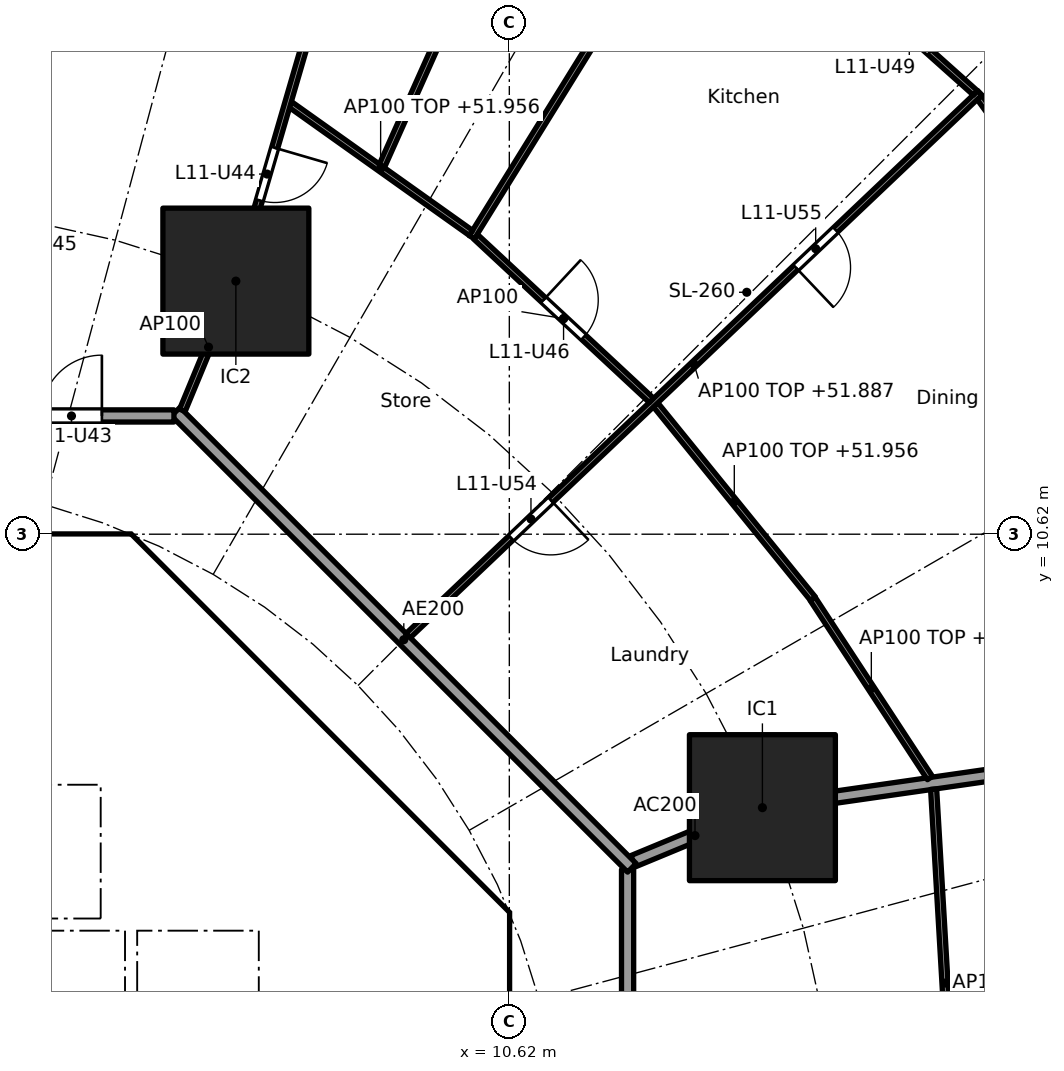
"""IFC4 building model, lengths in metres.
Left out: names, types, materials, properties, quantities, classifications, styles, units other than length and angle.
Written with IfcOpenShell. Run it as: python <this file> out.ifc"""

import sys

from ifc_helpers import new_model, si_unit, direction, frame, frame_2d, origin, origin_2d, place, context, subcontext, project, spatial, polyline, rectangle, outline, extrude, element, fill, save


model = new_model("IFC4")
c1 = context("Model", 3, precision=1e-05, world=origin(), true_north=direction((0.0, 1.0)))
c2 = subcontext(c1, "Body", "Model", "MODEL_VIEW")
j1 = project(units=[si_unit("LENGTHUNIT", "METRE"), si_unit("PLANEANGLEUNIT", "RADIAN")], contexts=[c1])
p1 = place(None, origin())
s1 = spatial("IfcSite", under=j1, at=p1, CompositionType="ELEMENT")
p2 = place(p1, origin())
s2 = spatial("IfcBuilding", under=s1, at=p2, CompositionType="ELEMENT")
p3 = place(p2, frame((0.0, 0.0, 49.2)))
s3 = spatial("IfcBuildingStorey", under=s2, at=p3, CompositionType="ELEMENT", Elevation=49.2)
for number, where, z_axis, x_axis in (
    (1, (14.782, 6.123, 0.0), (0.0, 0.0, 1.0), (1.0, 0.0, 0.0)),
    (2, (6.123, 14.782, 0.0), (0.0, 0.0, 1.0), (1.0, 0.0, 0.0)),
):
    element("IfcColumn", number, at=place(p3, frame(where, z_axis=z_axis, x_axis=x_axis)), inside=s3, PredefinedType="COLUMN", context=c2, shape_type="SweptSolid", body=[
        extrude(rectangle(XDim=2.4, YDim=2.4, at=origin_2d()), origin(), (0.0, 0.0, 1.0), 3.7),
    ])
p4 = place(p3, frame((9.988, 4.613, 0.0), z_axis=(0.0, 0.0, 1.0), x_axis=(-0.707106781187, 0.707106781187, 0.0)))
e3 = element("IfcWall", 3, at=p4, inside=s3, PredefinedType="SHEAR", context=c2, shape_type="SweptSolid", body=[
    extrude(rectangle(XDim=7.602, YDim=0.6, at=frame_2d((3.801, 0.0))), origin(), (0.0, 0.0, 1.0), 3.44),
])
p5 = place(p4, frame((3.201, 0.0, 0.0)))
e4 = element("IfcOpeningElement", 4, at=p5, cuts=e3, PredefinedType="OPENING", context=c2, shape_type="SweptSolid", body=[
    extrude(rectangle(XDim=1.2, YDim=2.1, at=frame_2d((0.6, 1.05))), frame((0.0, 0.31, 0.0), z_axis=(0.0, -1.0, 0.0), x_axis=(1.0, 0.0, 0.0)), (0.0, 0.0, 1.0), 0.62),
])
p6 = place(p3, frame((4.0, 4.3, 0.0), z_axis=(0.0, 0.0, 1.0), x_axis=(0.0, 1.0, 0.0)))
e5 = element("IfcWall", 5, at=p6, inside=s3, PredefinedType="SOLIDWALL", context=c2, shape_type="SweptSolid", body=[
    extrude(rectangle(XDim=2.2, YDim=0.2, at=frame_2d((1.1, 0.0))), origin(), (0.0, 0.0, 1.0), 3.44),
])
p7 = place(p6, frame((0.55, 0.0, 0.0)))
e6 = element("IfcOpeningElement", 6, at=p7, cuts=e5, PredefinedType="OPENING", context=c2, shape_type="SweptSolid", body=[
    extrude(rectangle(XDim=1.1, YDim=2.1, at=frame_2d((0.55, 1.05))), frame((0.0, 0.11, 0.0), z_axis=(0.0, -1.0, 0.0), x_axis=(1.0, 0.0, 0.0)), (0.0, 0.0, 1.0), 0.22),
])
p8 = place(p3, frame((6.7, 4.0, 0.0), z_axis=(0.0, 0.0, 1.0), x_axis=(1.0, 0.0, 0.0)))
e7 = element("IfcWall", 7, at=p8, inside=s3, PredefinedType="SOLIDWALL", context=c2, shape_type="SweptSolid", body=[
    extrude(rectangle(XDim=3.325, YDim=0.2, at=frame_2d((1.662, 0.0))), origin(), (0.0, 0.0, 1.0), 3.44),
])
p9 = place(p8, frame((1.25, 0.0, 0.0)))
e8 = element("IfcOpeningElement", 8, at=p9, cuts=e7, PredefinedType="OPENING", context=c2, shape_type="SweptSolid", body=[
    extrude(rectangle(XDim=1.1, YDim=2.1, at=frame_2d((0.55, 1.05))), frame((0.0, 0.11, 0.0), z_axis=(0.0, -1.0, 0.0), x_axis=(1.0, 0.0, 0.0)), (0.0, 0.0, 1.0), 0.22),
])
p10 = place(p3, frame((4.0, 7.025, 0.0), z_axis=(0.0, 0.0, 1.0), x_axis=(0.0, 1.0, 0.0)))
e9 = element("IfcWall", 9, at=p10, inside=s3, PredefinedType="SOLIDWALL", context=c2, shape_type="SweptSolid", body=[
    extrude(rectangle(XDim=3.0, YDim=0.2, at=frame_2d((1.5, 0.0))), origin(), (0.0, 0.0, 1.0), 3.44),
])
p11 = place(p10, frame((0.925, 0.0, 0.0)))
e10 = element("IfcOpeningElement", 10, at=p11, cuts=e9, PredefinedType="OPENING", context=c2, shape_type="SweptSolid", body=[
    extrude(rectangle(XDim=1.1, YDim=2.1, at=frame_2d((0.55, 1.05))), frame((0.0, 0.11, 0.0), z_axis=(0.0, -1.0, 0.0), x_axis=(1.0, 0.0, 0.0)), (0.0, 0.0, 1.0), 0.22),
])
p12 = place(p3, origin())
e11 = element("IfcWall", 11, at=p12, inside=s3, PredefinedType="SHEAR", context=c2, shape_type="SweptSolid", body=[
    extrude(outline(polyline([(-4.152, 10.025), (-4.401, 9.776), (-4.825, 10.2), (-4.401, 10.625), (4.401, 10.625), (4.825, 10.2), (4.401, 9.776), (4.152, 10.025), (-4.152, 10.025)])), origin(), (0.0, 0.0, 1.0), 3.44),
])
p13 = place(p3, origin())
e12 = element("IfcWall", 12, at=p13, inside=s3, PredefinedType="SHEAR", context=c2, shape_type="SweptSolid", body=[
    extrude(outline(polyline([(9.776, -4.401), (10.025, -4.152), (10.025, -3.801), (10.025, 4.152), (9.776, 4.401), (10.2, 4.825), (10.625, 4.401), (10.625, -4.401), (10.2, -4.825), (9.776, -4.401)])), origin(), (0.0, 0.0, 1.0), 3.44),
])
p14 = place(p3, origin())
e13 = element("IfcWall", 13, at=p14, inside=s3, PredefinedType="SOLIDWALL", context=c2, shape_type="SweptSolid", body=[
    extrude(outline(polyline([(-6.5, 2.1), (-6.7, 2.1), (-6.7, 4.3), (6.7, 4.3), (6.7, 2.1), (6.5, 2.1), (6.5, 4.1), (4.5, 4.1), (4.5, 2.1), (4.3, 2.1), (4.3, 4.1), (2.3, 4.1), (2.3, 2.1), (2.1, 2.1), (2.1, 4.1), (0.1, 4.1), (0.1, 2.1), (-0.1, 2.1), (-0.1, 4.1), (-2.1, 4.1), (-2.1, 2.1), (-2.3, 2.1), (-2.3, 4.1), (-4.3, 4.1), (-4.3, 2.1), (-4.5, 2.1), (-4.5, 4.1), (-6.5, 4.1), (-6.5, 2.1)])), origin(), (0.0, 0.0, 1.0), 3.44),
])
p15 = place(p3, origin())
e14 = element("IfcWall", 14, at=p15, inside=s3, PredefinedType="SOLIDWALL", context=c2, shape_type="SweptSolid", body=[
    extrude(outline(polyline([(4.1, 6.5), (-4.1, 6.5), (-4.1, 7.025), (4.1, 7.025), (4.1, 6.5)])), origin(), (0.0, 0.0, 1.0), 3.44),
])
p16 = place(p3, origin())
e15 = element("IfcWall", 15, at=p16, inside=s3, PredefinedType="SOLIDWALL", context=c2, shape_type="SweptSolid", body=[
    extrude(outline(polyline([(7.025, -3.9), (6.7, -3.9), (6.7, 3.9), (7.025, 3.9), (7.025, -3.9)])), origin(), (0.0, 0.0, 1.0), 3.44),
])
p17 = place(p3, frame((12.657, 5.243, 0.0), z_axis=(0.0, 0.0, 1.0), x_axis=(0.923853160736, 0.382747093259, 0.0)))
e16 = element("IfcWall", 16, at=p17, inside=s3, PredefinedType="PARTITIONING", context=c2, shape_type="SweptSolid", body=[
    extrude(rectangle(XDim=2.2, YDim=0.2, at=frame_2d((1.1, 0.0))), origin(), (0.0, 0.0, 1.0), 3.44),
])
p18 = place(p3, frame((14.832, 6.13, 0.0), z_axis=(0.0, 0.0, 1.0), x_axis=(0.989836541293, 0.142209779978, 0.0)))
e17 = element("IfcWall", 17, at=p18, inside=s3, PredefinedType="PARTITIONING", context=c2, shape_type="SweptSolid", body=[
    extrude(rectangle(XDim=15.909, YDim=0.2, at=frame_2d((7.955, 0.0))), origin(), (0.0, 0.0, 1.0), 2.756),
])
p19 = place(p3, frame((12.565, -5.104, 0.0), z_axis=(0.0, 0.0, 1.0), x_axis=(0.0, 1.0, 0.0)))
e18 = element("IfcWall", 18, at=p19, inside=s3, PredefinedType="PARTITIONING", context=c2, shape_type="SweptSolid", body=[
    extrude(rectangle(XDim=10.209, YDim=0.2, at=frame_2d((5.104, 0.0))), origin(), (0.0, 0.0, 1.0), 3.44),
])
p20 = place(p3, frame((12.635, 5.134, 0.0), z_axis=(0.0, 0.0, 1.0), x_axis=(-0.707106781187, 0.707106781187, 0.0)))
e19 = element("IfcWall", 19, at=p20, inside=s3, PredefinedType="PARTITIONING", context=c2, shape_type="SweptSolid", body=[
    extrude(rectangle(XDim=10.609, YDim=0.2, at=frame_2d((5.305, 0.0))), origin(), (0.0, 0.0, 1.0), 3.44),
])
p21 = place(p3, frame((5.104, 12.565, 0.0), z_axis=(0.0, 0.0, 1.0), x_axis=(-1.0, 0.0, 0.0)))
e20 = element("IfcWall", 20, at=p21, inside=s3, PredefinedType="PARTITIONING", context=c2, shape_type="SweptSolid", body=[
    extrude(rectangle(XDim=10.409, YDim=0.2, at=frame_2d((5.205, 0.0))), origin(), (0.0, 0.0, 1.0), 3.44),
])
p22 = place(p21, frame((1.185, 0.0, 0.0)))
e21 = element("IfcOpeningElement", 21, at=p22, cuts=e20, PredefinedType="OPENING", context=c2, shape_type="SweptSolid", body=[
    extrude(rectangle(XDim=1.0, YDim=2.1, at=frame_2d((0.5, 1.05))), frame((0.0, 0.11, 0.0), z_axis=(0.0, -1.0, 0.0), x_axis=(1.0, 0.0, 0.0)), (0.0, 0.0, 1.0), 0.22),
])
p23 = place(p3, frame((17.971, 0.05, 0.0), z_axis=(0.0, 0.0, 1.0), x_axis=(-0.058513659907, 0.998286607946, 0.0)))
e22 = element("IfcWall", 22, at=p23, inside=s3, PredefinedType="PARTITIONING", context=c2, shape_type="SweptSolid", body=[
    extrude(rectangle(XDim=6.388, YDim=0.1, at=frame_2d((3.194, 0.0))), origin(), (0.0, 0.0, 1.0), 2.756),
])
p24 = place(p3, frame((17.537, 6.61, 0.0), z_axis=(0.0, 0.0, 1.0), x_axis=(-0.547637987196, 0.836715384692, 0.0)))
e23 = element("IfcWall", 23, at=p24, inside=s3, PredefinedType="PARTITIONING", context=c2, shape_type="SweptSolid", body=[
    extrude(rectangle(XDim=3.52, YDim=0.1, at=frame_2d((1.76, 0.0))), origin(), (0.0, 0.0, 1.0), 2.756),
])
p25 = place(p3, frame((15.614, 9.559, 0.0), z_axis=(0.0, 0.0, 1.0), x_axis=(-0.63012473344, 0.776493928056, 0.0)))
e24 = element("IfcWall", 24, at=p25, inside=s3, PredefinedType="PARTITIONING", context=c2, shape_type="SweptSolid", body=[
    extrude(rectangle(XDim=4.106, YDim=0.1, at=frame_2d((2.053, 0.0))), origin(), (0.0, 0.0, 1.0), 2.756),
])
p26 = place(p3, frame((21.908, 12.866, 0.0), z_axis=(0.0, 0.0, 1.0), x_axis=(-0.584558392935, 0.811351640936, 0.0)))
e25 = element("IfcWall", 25, at=p26, inside=s3, PredefinedType="PARTITIONING", context=c2, shape_type="SweptSolid", body=[
    extrude(rectangle(XDim=6.084, YDim=0.1, at=frame_2d((3.042, 0.0))), origin(), (0.0, 0.0, 1.0), 2.756),
])
p27 = place(p3, frame((8.957, 8.953, 0.0), z_axis=(0.0, 0.0, 1.0), x_axis=(0.725250022034, 0.688485588476, 0.0)))
e26 = element("IfcWall", 26, at=p27, inside=s3, PredefinedType="PARTITIONING", context=c2, shape_type="SweptSolid", body=[
    extrude(rectangle(XDim=12.963, YDim=0.1, at=frame_2d((6.481, 0.0))), origin(), (0.0, 0.0, 1.0), 2.687),
])
p28 = place(p27, frame((2.333, 0.0, 0.0)))
e27 = element("IfcOpeningElement", 27, at=p28, cuts=e26, PredefinedType="OPENING", context=c2, shape_type="SweptSolid", body=[
    extrude(rectangle(XDim=0.9, YDim=2.1, at=frame_2d((0.45, 1.05))), frame((0.0, 0.06, 0.0), z_axis=(0.0, -1.0, 0.0), x_axis=(1.0, 0.0, 0.0)), (0.0, 0.0, 1.0), 0.12),
])
p29 = place(p27, frame((8.79, 0.0, 0.0)))
e28 = element("IfcOpeningElement", 28, at=p29, cuts=e26, PredefinedType="OPENING", context=c2, shape_type="SweptSolid", body=[
    extrude(rectangle(XDim=0.9, YDim=2.1, at=frame_2d((0.45, 1.05))), frame((0.0, 0.06, 0.0), z_axis=(0.0, -1.0, 0.0), x_axis=(1.0, 0.0, 0.0)), (0.0, 0.0, 1.0), 0.12),
])
p30 = place(p3, frame((12.958, 12.82, 0.0), z_axis=(0.0, 0.0, 1.0), x_axis=(-0.732022571638, 0.681280378855, 0.0)))
e29 = element("IfcWall", 29, at=p30, inside=s3, PredefinedType="PARTITIONING", context=c2, shape_type="SweptSolid", body=[
    extrude(rectangle(XDim=3.95, YDim=0.1, at=frame_2d((1.975, 0.0))), origin(), (0.0, 0.0, 1.0), 3.44),
])
p31 = place(p30, frame((1.525, 0.0, 0.0)))
e30 = element("IfcOpeningElement", 30, at=p31, cuts=e29, PredefinedType="OPENING", context=c2, shape_type="SweptSolid", body=[
    extrude(rectangle(XDim=0.9, YDim=2.1, at=frame_2d((0.45, 1.05))), frame((0.0, 0.06, 0.0), z_axis=(0.0, -1.0, 0.0), x_axis=(1.0, 0.0, 0.0)), (0.0, 0.0, 1.0), 0.12),
])
p32 = place(p3, frame((18.285, 17.877, 0.0), z_axis=(0.0, 0.0, 1.0), x_axis=(-0.745806142791, 0.666163041136, 0.0)))
e31 = element("IfcWall", 31, at=p32, inside=s3, PredefinedType="PARTITIONING", context=c2, shape_type="SweptSolid", body=[
    extrude(rectangle(XDim=5.831, YDim=0.1, at=frame_2d((2.915, 0.0))), origin(), (0.0, 0.0, 1.0), 2.756),
])
p33 = place(p32, frame((1.008, 0.0, 0.0)))
e32 = element("IfcOpeningElement", 32, at=p33, cuts=e31, PredefinedType="OPENING", context=c2, shape_type="SweptSolid", body=[
    extrude(rectangle(XDim=0.9, YDim=2.1, at=frame_2d((0.45, 1.05))), frame((0.0, 0.06, 0.0), z_axis=(0.0, -1.0, 0.0), x_axis=(1.0, 0.0, 0.0)), (0.0, 0.0, 1.0), 0.12),
])
p34 = place(p3, frame((10.003, 15.503, 0.0), z_axis=(0.0, 0.0, 1.0), x_axis=(0.52645953022, 0.850200189979, 0.0)))
e33 = element("IfcWall", 33, at=p34, inside=s3, PredefinedType="PARTITIONING", context=c2, shape_type="SweptSolid", body=[
    extrude(rectangle(XDim=7.45, YDim=0.1, at=frame_2d((3.725, 0.0))), origin(), (0.0, 0.0, 1.0), 2.756),
])
p35 = place(p3, frame((9.989, 15.574, 0.0), z_axis=(0.0, 0.0, 1.0), x_axis=(-0.81494477814, 0.57953861699, 0.0)))
e34 = element("IfcWall", 34, at=p35, inside=s3, PredefinedType="PARTITIONING", context=c2, shape_type="SweptSolid", body=[
    extrude(rectangle(XDim=3.644, YDim=0.1, at=frame_2d((1.822, 0.0))), origin(), (0.0, 0.0, 1.0), 2.756),
])
p36 = place(p3, frame((8.524, 16.676, 0.0), z_axis=(0.0, 0.0, 1.0), x_axis=(0.408065177262, 0.912952797852, 0.0)))
e35 = element("IfcWall", 35, at=p36, inside=s3, PredefinedType="PARTITIONING", context=c2, shape_type="SweptSolid", body=[
    extrude(rectangle(XDim=15.089, YDim=0.1, at=frame_2d((7.544, 0.0))), origin(), (0.0, 0.0, 1.0), 2.837),
])
p37 = place(p3, frame((5.243, 12.657, 0.0), z_axis=(0.0, 0.0, 1.0), x_axis=(0.382719158442, 0.923864733477, 0.0)))
e36 = element("IfcWall", 36, at=p37, inside=s3, PredefinedType="PARTITIONING", context=c2, shape_type="SweptSolid", body=[
    extrude(rectangle(XDim=2.25, YDim=0.1, at=frame_2d((1.125, 0.0))), origin(), (0.0, 0.0, 1.0), 3.44),
])
p38 = place(p3, frame((6.137, 14.83, 0.0), z_axis=(0.0, 0.0, 1.0), x_axis=(0.279843546189, 0.960045618529, 0.0)))
e37 = element("IfcWall", 37, at=p38, inside=s3, PredefinedType="PARTITIONING", context=c2, shape_type="SweptSolid", body=[
    extrude(rectangle(XDim=10.127, YDim=0.1, at=frame_2d((5.063, 0.0))), origin(), (0.0, 0.0, 1.0), 3.44),
])
p39 = place(p38, frame((1.334, 0.0, 0.0)))
e38 = element("IfcOpeningElement", 38, at=p39, cuts=e37, PredefinedType="OPENING", context=c2, shape_type="SweptSolid", body=[
    extrude(rectangle(XDim=0.9, YDim=2.1, at=frame_2d((0.45, 1.05))), frame((0.0, 0.06, 0.0), z_axis=(0.0, -1.0, 0.0), x_axis=(1.0, 0.0, 0.0)), (0.0, 0.0, 1.0), 0.12),
])
p40 = place(p38, frame((6.091, 0.0, 0.0)))
e39 = element("IfcOpeningElement", 39, at=p40, cuts=e37, PredefinedType="OPENING", context=c2, shape_type="SweptSolid", body=[
    extrude(rectangle(XDim=0.9, YDim=2.1, at=frame_2d((0.45, 1.05))), frame((0.0, 0.06, 0.0), z_axis=(0.0, -1.0, 0.0), x_axis=(1.0, 0.0, 0.0)), (0.0, 0.0, 1.0), 0.12),
])
p41 = place(p3, frame((1.744, 12.664, 0.0), z_axis=(0.0, 0.0, 1.0), x_axis=(0.090893639596, 0.995860605849, 0.0)))
e40 = element("IfcWall", 40, at=p41, inside=s3, PredefinedType="PARTITIONING", context=c2, shape_type="SweptSolid", body=[
    extrude(rectangle(XDim=19.374, YDim=0.1, at=frame_2d((9.687, 0.0))), origin(), (0.0, 0.0, 1.0), 2.687),
])
p42 = place(p41, frame((2.27, 0.0, 0.0)))
e41 = element("IfcOpeningElement", 41, at=p42, cuts=e40, PredefinedType="OPENING", context=c2, shape_type="SweptSolid", body=[
    extrude(rectangle(XDim=0.9, YDim=2.1, at=frame_2d((0.45, 1.05))), frame((0.0, 0.06, 0.0), z_axis=(0.0, -1.0, 0.0), x_axis=(1.0, 0.0, 0.0)), (0.0, 0.0, 1.0), 0.12),
])
p43 = place(p41, frame((8.582, 0.0, 0.0)))
e42 = element("IfcOpeningElement", 42, at=p43, cuts=e40, PredefinedType="OPENING", context=c2, shape_type="SweptSolid", body=[
    extrude(rectangle(XDim=0.9, YDim=2.1, at=frame_2d((0.45, 1.05))), frame((0.0, 0.06, 0.0), z_axis=(0.0, -1.0, 0.0), x_axis=(1.0, 0.0, 0.0)), (0.0, 0.0, 1.0), 0.12),
])
p44 = place(p41, frame((15.548, 0.0, 0.0)))
e43 = element("IfcOpeningElement", 43, at=p44, cuts=e40, PredefinedType="OPENING", context=c2, shape_type="SweptSolid", body=[
    extrude(rectangle(XDim=0.9, YDim=2.1, at=frame_2d((0.45, 1.05))), frame((0.0, 0.06, 0.0), z_axis=(0.0, -1.0, 0.0), x_axis=(1.0, 0.0, 0.0)), (0.0, 0.0, 1.0), 0.12),
])
p45 = place(p7, origin())
e44 = element("IfcDoor", 44, at=p45, inside=s3, OperationType="DOUBLE_DOOR_SLIDING", PredefinedType="DOOR", context=c2, shape_type="SweptSolid", body=[
    extrude(rectangle(XDim=1.1, YDim=2.1, at=frame_2d((0.55, 1.05))), frame((0.0, 0.025, 0.0), z_axis=(0.0, -1.0, 0.0), x_axis=(1.0, 0.0, 0.0)), (0.0, 0.0, 1.0), 0.05),
])
fill(e6, e44)
p46 = place(p9, frame((1.1, 0.0, 0.0), x_axis=(-1.0, 0.0, 0.0)))
e45 = element("IfcDoor", 45, at=p46, inside=s3, OperationType="SINGLE_SWING_LEFT", PredefinedType="DOOR", context=c2, shape_type="SweptSolid", body=[
    extrude(rectangle(XDim=1.1, YDim=2.1, at=frame_2d((0.55, 1.05))), frame((0.0, 0.025, 0.0), z_axis=(0.0, -1.0, 0.0), x_axis=(1.0, 0.0, 0.0)), (0.0, 0.0, 1.0), 0.05),
])
fill(e8, e45)
p47 = place(p11, origin())
e46 = element("IfcDoor", 46, at=p47, inside=s3, OperationType="SINGLE_SWING_RIGHT", PredefinedType="DOOR", context=c2, shape_type="SweptSolid", body=[
    extrude(rectangle(XDim=1.1, YDim=2.1, at=frame_2d((0.55, 1.05))), frame((0.0, 0.025, 0.0), z_axis=(0.0, -1.0, 0.0), x_axis=(1.0, 0.0, 0.0)), (0.0, 0.0, 1.0), 0.05),
])
fill(e10, e46)
p48 = place(p5, origin())
e47 = element("IfcDoor", 47, at=p48, inside=s3, OperationType="SINGLE_SWING_RIGHT", PredefinedType="DOOR", context=c2, shape_type="SweptSolid", body=[
    extrude(rectangle(XDim=1.2, YDim=2.1, at=frame_2d((0.6, 1.05))), frame((0.0, 0.025, 0.0), z_axis=(0.0, -1.0, 0.0), x_axis=(1.0, 0.0, 0.0)), (0.0, 0.0, 1.0), 0.05),
])
fill(e4, e47)
p49 = place(p22, frame((1.0, 0.0, 0.0), x_axis=(-1.0, 0.0, 0.0)))
e48 = element("IfcDoor", 48, at=p49, inside=s3, OperationType="SINGLE_SWING_RIGHT", PredefinedType="DOOR", context=c2, shape_type="SweptSolid", body=[
    extrude(rectangle(XDim=1.0, YDim=2.1, at=frame_2d((0.5, 1.05))), frame((0.0, 0.025, 0.0), z_axis=(0.0, -1.0, 0.0), x_axis=(1.0, 0.0, 0.0)), (0.0, 0.0, 1.0), 0.05),
])
fill(e21, e48)
p50 = place(p39, frame((0.9, 0.0, 0.0), x_axis=(-1.0, 0.0, 0.0)))
e49 = element("IfcDoor", 49, at=p50, inside=s3, OperationType="SINGLE_SWING_LEFT", PredefinedType="DOOR", context=c2, shape_type="SweptSolid", body=[
    extrude(rectangle(XDim=0.9, YDim=2.1, at=frame_2d((0.45, 1.05))), frame((0.0, 0.025, 0.0), z_axis=(0.0, -1.0, 0.0), x_axis=(1.0, 0.0, 0.0)), (0.0, 0.0, 1.0), 0.05),
])
fill(e38, e49)
p51 = place(p31, frame((0.9, 0.0, 0.0), x_axis=(-1.0, 0.0, 0.0)))
e50 = element("IfcDoor", 50, at=p51, inside=s3, OperationType="SINGLE_SWING_LEFT", PredefinedType="DOOR", context=c2, shape_type="SweptSolid", body=[
    extrude(rectangle(XDim=0.9, YDim=2.1, at=frame_2d((0.45, 1.05))), frame((0.0, 0.025, 0.0), z_axis=(0.0, -1.0, 0.0), x_axis=(1.0, 0.0, 0.0)), (0.0, 0.0, 1.0), 0.05),
])
fill(e30, e50)
p52 = place(p33, frame((0.9, 0.0, 0.0), x_axis=(-1.0, 0.0, 0.0)))
e51 = element("IfcDoor", 51, at=p52, inside=s3, OperationType="SINGLE_SWING_RIGHT", PredefinedType="DOOR", context=c2, shape_type="SweptSolid", body=[
    extrude(rectangle(XDim=0.9, YDim=2.1, at=frame_2d((0.45, 1.05))), frame((0.0, 0.025, 0.0), z_axis=(0.0, -1.0, 0.0), x_axis=(1.0, 0.0, 0.0)), (0.0, 0.0, 1.0), 0.05),
])
fill(e32, e51)
p53 = place(p28, frame((0.9, 0.0, 0.0), x_axis=(-1.0, 0.0, 0.0)))
e52 = element("IfcDoor", 52, at=p53, inside=s3, OperationType="SINGLE_SWING_LEFT", PredefinedType="DOOR", context=c2, shape_type="SweptSolid", body=[
    extrude(rectangle(XDim=0.9, YDim=2.1, at=frame_2d((0.45, 1.05))), frame((0.0, 0.025, 0.0), z_axis=(0.0, -1.0, 0.0), x_axis=(1.0, 0.0, 0.0)), (0.0, 0.0, 1.0), 0.05),
])
fill(e27, e52)
p54 = place(p29, frame((0.9, 0.0, 0.0), x_axis=(-1.0, 0.0, 0.0)))
e53 = element("IfcDoor", 53, at=p54, inside=s3, OperationType="SINGLE_SWING_RIGHT", PredefinedType="DOOR", context=c2, shape_type="SweptSolid", body=[
    extrude(rectangle(XDim=0.9, YDim=2.1, at=frame_2d((0.45, 1.05))), frame((0.0, 0.025, 0.0), z_axis=(0.0, -1.0, 0.0), x_axis=(1.0, 0.0, 0.0)), (0.0, 0.0, 1.0), 0.05),
])
fill(e28, e53)
save(model, sys.argv[1])
